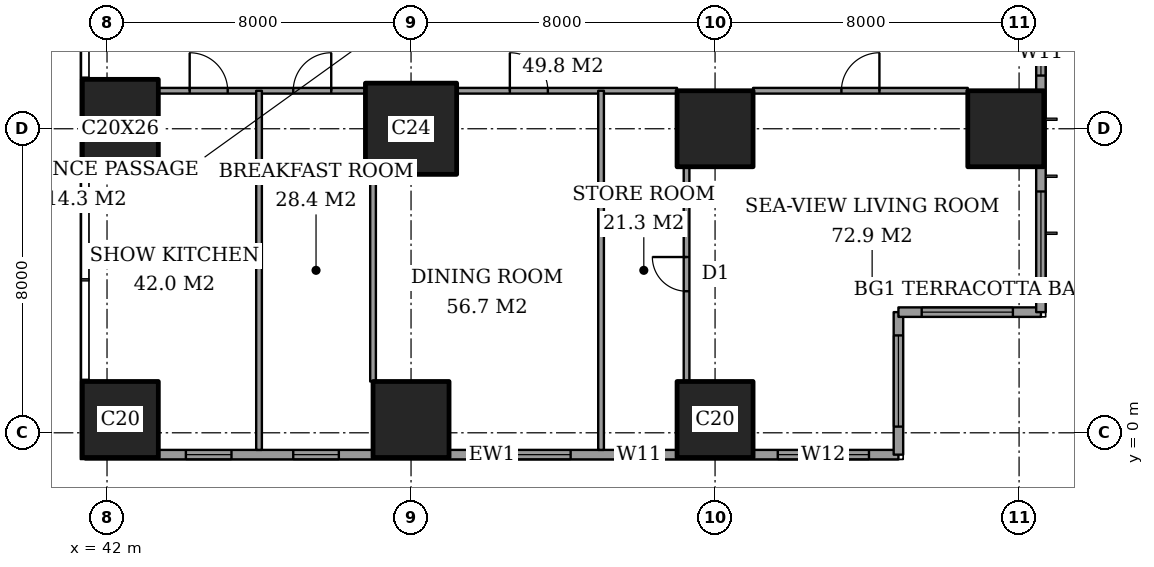
"""IFC4 building model, lengths in metres.
Left out: names, types, materials, properties, quantities, classifications, styles, units other than length and angle.
Written with IfcOpenShell. Run it as: python <this file> out.ifc"""

import sys

from ifc_helpers import new_model, si_unit, direction, frame, frame_2d, origin, origin_2d, place, context, subcontext, project, spatial, rectangle, extrude, element, fill, save


model = new_model("IFC4")
c1 = context("Model", 3, precision=1e-05, world=origin(), true_north=direction((0.0, 1.0)))
c2 = subcontext(c1, "Body", "Model", "MODEL_VIEW")
j1 = project(units=[si_unit("LENGTHUNIT", "METRE"), si_unit("PLANEANGLEUNIT", "RADIAN")], contexts=[c1])
p1 = place(None, origin())
s1 = spatial("IfcSite", under=j1, at=p1, CompositionType="ELEMENT")
p2 = place(p1, origin())
s2 = spatial("IfcBuilding", under=s1, at=p2, CompositionType="ELEMENT")
p3 = place(p2, frame((0.0, 0.0, 161.0)))
s3 = spatial("IfcBuildingStorey", under=s2, at=p3, CompositionType="ELEMENT", Elevation=161.0)
p4 = place(p3, frame((42.35, 0.35, 0.0), z_axis=(0.0, 0.0, 1.0), x_axis=(1.0, 0.0, 0.0)))
e1 = element("IfcColumn", 1, at=p4, inside=s3, PredefinedType="COLUMN", context=c2, shape_type="SweptSolid", body=[
    extrude(rectangle(XDim=2.0, YDim=2.0, at=origin_2d()), origin(), (0.0, 0.0, 1.0), 3.6),
])
p5 = place(p3, frame((42.35, 8.0, 0.0), z_axis=(0.0, 0.0, 1.0), x_axis=(1.0, 0.0, 0.0)))
e2 = element("IfcColumn", 2, at=p5, inside=s3, PredefinedType="COLUMN", context=c2, shape_type="SweptSolid", body=[
    extrude(rectangle(XDim=2.0, YDim=2.6, at=origin_2d()), origin(), (0.0, 0.0, 1.0), 3.6),
])
p6 = place(p3, frame((50.0, 0.35, 0.0), z_axis=(0.0, 0.0, 1.0), x_axis=(1.0, 0.0, 0.0)))
e3 = element("IfcColumn", 3, at=p6, inside=s3, PredefinedType="COLUMN", context=c2, shape_type="SweptSolid", body=[
    extrude(rectangle(XDim=2.0, YDim=2.0, at=origin_2d()), origin(), (0.0, 0.0, 1.0), 3.6),
])
p7 = place(p3, frame((50.0, 8.0, 0.0), z_axis=(0.0, 0.0, 1.0), x_axis=(1.0, 0.0, 0.0)))
e4 = element("IfcColumn", 4, at=p7, inside=s3, PredefinedType="COLUMN", context=c2, shape_type="SweptSolid", body=[
    extrude(rectangle(XDim=2.4, YDim=2.4, at=origin_2d()), origin(), (0.0, 0.0, 1.0), 3.6),
])
for number, where, z_axis, x_axis in (
    (5, (58.0, 0.35, 0.0), (0.0, 0.0, 1.0), (1.0, 0.0, 0.0)),
    (6, (58.0, 8.0, 0.0), (0.0, 0.0, 1.0), (1.0, 0.0, 0.0)),
    (7, (65.65, 8.0, 0.0), (0.0, 0.0, 1.0), (1.0, 0.0, 0.0)),
):
    element("IfcColumn", number, at=place(p3, frame(where, z_axis=z_axis, x_axis=x_axis)), inside=s3, PredefinedType="COLUMN", context=c2, shape_type="SweptSolid", body=[
        extrude(rectangle(XDim=2.0, YDim=2.0, at=origin_2d()), origin(), (0.0, 0.0, 1.0), 3.6),
    ])
p8 = place(p3, frame((41.425, -0.575, 0.0), z_axis=(0.0, 0.0, 1.0), x_axis=(1.0, 0.0, 0.0)))
e8 = element("IfcWall", 8, at=p8, inside=s3, PredefinedType="SOLIDWALL", context=c2, shape_type="SweptSolid", body=[
    extrude(rectangle(XDim=21.4, YDim=0.25, at=frame_2d((10.7, 0.0))), origin(), (0.0, 0.0, 1.0), 3.6),
])
p9 = place(p8, frame((2.65, 0.0, 0.4)))
e9 = element("IfcOpeningElement", 9, at=p9, cuts=e8, PredefinedType="OPENING", context=c2, shape_type="SweptSolid", body=[
    extrude(rectangle(XDim=1.2, YDim=2.2, at=frame_2d((0.6, 1.1))), frame((0.0, 0.135, 0.0), z_axis=(0.0, -1.0, 0.0), x_axis=(1.0, 0.0, 0.0)), (0.0, 0.0, 1.0), 0.27),
])
p10 = place(p8, frame((5.475, 0.0, 0.4)))
e10 = element("IfcOpeningElement", 10, at=p10, cuts=e8, PredefinedType="OPENING", context=c2, shape_type="SweptSolid", body=[
    extrude(rectangle(XDim=1.2, YDim=2.2, at=frame_2d((0.6, 1.1))), frame((0.0, 0.135, 0.0), z_axis=(0.0, -1.0, 0.0), x_axis=(1.0, 0.0, 0.0)), (0.0, 0.0, 1.0), 0.27),
])
p11 = place(p8, frame((10.375, 0.0, 0.4)))
e11 = element("IfcOpeningElement", 11, at=p11, cuts=e8, PredefinedType="OPENING", context=c2, shape_type="SweptSolid", body=[
    extrude(rectangle(XDim=2.4, YDim=2.2, at=frame_2d((1.2, 1.1))), frame((0.0, 0.135, 0.0), z_axis=(0.0, -1.0, 0.0), x_axis=(1.0, 0.0, 0.0)), (0.0, 0.0, 1.0), 0.27),
])
p12 = place(p8, frame((13.975, 0.0, 0.4)))
e12 = element("IfcOpeningElement", 12, at=p12, cuts=e8, PredefinedType="OPENING", context=c2, shape_type="SweptSolid", body=[
    extrude(rectangle(XDim=1.2, YDim=2.2, at=frame_2d((0.6, 1.1))), frame((0.0, 0.135, 0.0), z_axis=(0.0, -1.0, 0.0), x_axis=(1.0, 0.0, 0.0)), (0.0, 0.0, 1.0), 0.27),
])
p13 = place(p8, frame((18.225, 0.0, 0.4)))
e13 = element("IfcOpeningElement", 13, at=p13, cuts=e8, PredefinedType="OPENING", context=c2, shape_type="SweptSolid", body=[
    extrude(rectangle(XDim=2.4, YDim=2.2, at=frame_2d((1.2, 1.1))), frame((0.0, 0.135, 0.0), z_axis=(0.0, -1.0, 0.0), x_axis=(1.0, 0.0, 0.0)), (0.0, 0.0, 1.0), 0.27),
])
p14 = place(p3, frame((62.825, -0.575, 0.0), z_axis=(0.0, 0.0, 1.0), x_axis=(0.0, 1.0, 0.0)))
e14 = element("IfcWall", 14, at=p14, inside=s3, PredefinedType="SOLIDWALL", context=c2, shape_type="SweptSolid", body=[
    extrude(rectangle(XDim=3.75, YDim=0.25, at=frame_2d((1.875, 0.0))), origin(), (0.0, 0.0, 1.0), 3.6),
])
p15 = place(p14, frame((0.738, 0.0, 0.4)))
e15 = element("IfcOpeningElement", 15, at=p15, cuts=e14, PredefinedType="OPENING", context=c2, shape_type="SweptSolid", body=[
    extrude(rectangle(XDim=2.4, YDim=2.2, at=frame_2d((1.2, 1.1))), frame((0.0, 0.135, 0.0), z_axis=(0.0, -1.0, 0.0), x_axis=(1.0, 0.0, 0.0)), (0.0, 0.0, 1.0), 0.27),
])
p16 = place(p3, frame((62.825, 3.175, 0.0), z_axis=(0.0, 0.0, 1.0), x_axis=(1.0, 0.0, 0.0)))
e16 = element("IfcWall", 16, at=p16, inside=s3, PredefinedType="SOLIDWALL", context=c2, shape_type="SweptSolid", body=[
    extrude(rectangle(XDim=3.75, YDim=0.25, at=frame_2d((1.875, 0.0))), origin(), (0.0, 0.0, 1.0), 3.6),
])
p17 = place(p16, frame((0.613, 0.0, 0.4)))
e17 = element("IfcOpeningElement", 17, at=p17, cuts=e16, PredefinedType="OPENING", context=c2, shape_type="SweptSolid", body=[
    extrude(rectangle(XDim=2.4, YDim=2.2, at=frame_2d((1.2, 1.1))), frame((0.0, 0.135, 0.0), z_axis=(0.0, -1.0, 0.0), x_axis=(1.0, 0.0, 0.0)), (0.0, 0.0, 1.0), 0.27),
])
p18 = place(p3, frame((66.575, 3.175, 0.0), z_axis=(0.0, 0.0, 1.0), x_axis=(0.0, 1.0, 0.0)))
e18 = element("IfcWall", 18, at=p18, inside=s3, PredefinedType="SOLIDWALL", context=c2, shape_type="SweptSolid", body=[
    extrude(rectangle(XDim=41.65, YDim=0.25, at=frame_2d((20.825, 0.0))), origin(), (0.0, 0.0, 1.0), 3.6),
])
p19 = place(p18, frame((0.775, 0.0, 0.4)))
e19 = element("IfcOpeningElement", 19, at=p19, cuts=e18, PredefinedType="OPENING", context=c2, shape_type="SweptSolid", body=[
    extrude(rectangle(XDim=2.4, YDim=2.2, at=frame_2d((1.2, 1.1))), frame((0.0, 0.135, 0.0), z_axis=(0.0, -1.0, 0.0), x_axis=(1.0, 0.0, 0.0)), (0.0, 0.0, 1.0), 0.27),
])
p20 = place(p18, frame((6.225, 0.0, 0.4)))
e20 = element("IfcOpeningElement", 20, at=p20, cuts=e18, PredefinedType="OPENING", context=c2, shape_type="SweptSolid", body=[
    extrude(rectangle(XDim=1.2, YDim=2.2, at=frame_2d((0.6, 1.1))), frame((0.0, 0.135, 0.0), z_axis=(0.0, -1.0, 0.0), x_axis=(1.0, 0.0, 0.0)), (0.0, 0.0, 1.0), 0.27),
])
p21 = place(p18, frame((8.475, 0.0, 0.4)))
e21 = element("IfcOpeningElement", 21, at=p21, cuts=e18, PredefinedType="OPENING", context=c2, shape_type="SweptSolid", body=[
    extrude(rectangle(XDim=2.4, YDim=2.2, at=frame_2d((1.2, 1.1))), frame((0.0, 0.135, 0.0), z_axis=(0.0, -1.0, 0.0), x_axis=(1.0, 0.0, 0.0)), (0.0, 0.0, 1.0), 0.27),
])
p22 = place(p18, frame((15.775, 0.0, 0.4)))
e22 = element("IfcOpeningElement", 22, at=p22, cuts=e18, PredefinedType="OPENING", context=c2, shape_type="SweptSolid", body=[
    extrude(rectangle(XDim=2.4, YDim=2.2, at=frame_2d((1.2, 1.1))), frame((0.0, 0.135, 0.0), z_axis=(0.0, -1.0, 0.0), x_axis=(1.0, 0.0, 0.0)), (0.0, 0.0, 1.0), 0.27),
])
p23 = place(p18, frame((23.475, 0.0, 0.4)))
e23 = element("IfcOpeningElement", 23, at=p23, cuts=e18, PredefinedType="OPENING", context=c2, shape_type="SweptSolid", body=[
    extrude(rectangle(XDim=2.4, YDim=2.2, at=frame_2d((1.2, 1.1))), frame((0.0, 0.135, 0.0), z_axis=(0.0, -1.0, 0.0), x_axis=(1.0, 0.0, 0.0)), (0.0, 0.0, 1.0), 0.27),
])
p24 = place(p18, frame((30.975, 0.0, 0.4)))
e24 = element("IfcOpeningElement", 24, at=p24, cuts=e18, PredefinedType="OPENING", context=c2, shape_type="SweptSolid", body=[
    extrude(rectangle(XDim=2.4, YDim=2.2, at=frame_2d((1.2, 1.1))), frame((0.0, 0.135, 0.0), z_axis=(0.0, -1.0, 0.0), x_axis=(1.0, 0.0, 0.0)), (0.0, 0.0, 1.0), 0.27),
])
p25 = place(p18, frame((34.5, 0.0, 0.4)))
e25 = element("IfcOpeningElement", 25, at=p25, cuts=e18, PredefinedType="OPENING", context=c2, shape_type="SweptSolid", body=[
    extrude(rectangle(XDim=1.2, YDim=2.2, at=frame_2d((0.6, 1.1))), frame((0.0, 0.135, 0.0), z_axis=(0.0, -1.0, 0.0), x_axis=(1.0, 0.0, 0.0)), (0.0, 0.0, 1.0), 0.27),
])
p26 = place(p18, frame((38.475, 0.0, 0.4)))
e26 = element("IfcOpeningElement", 26, at=p26, cuts=e18, PredefinedType="OPENING", context=c2, shape_type="SweptSolid", body=[
    extrude(rectangle(XDim=2.4, YDim=2.2, at=frame_2d((1.2, 1.1))), frame((0.0, 0.135, 0.0), z_axis=(0.0, -1.0, 0.0), x_axis=(1.0, 0.0, 0.0)), (0.0, 0.0, 1.0), 0.27),
])
p27 = place(p3, frame((43.35, 9.0, 0.0), z_axis=(0.0, 0.0, 1.0), x_axis=(1.0, 0.0, 0.0)))
e27 = element("IfcWall", 27, at=p27, inside=s3, PredefinedType="PARTITIONING", context=c2, shape_type="SweptSolid", body=[
    extrude(rectangle(XDim=5.45, YDim=0.15, at=frame_2d((2.725, 0.0))), origin(), (0.0, 0.0, 1.0), 3.35),
])
p28 = place(p27, frame((3.55, 0.0, 0.0)))
e28 = element("IfcOpeningElement", 28, at=p28, cuts=e27, PredefinedType="OPENING", context=c2, shape_type="SweptSolid", body=[
    extrude(rectangle(XDim=1.0, YDim=2.1, at=frame_2d((0.5, 1.05))), frame((0.0, 0.085, 0.0), z_axis=(0.0, -1.0, 0.0), x_axis=(1.0, 0.0, 0.0)), (0.0, 0.0, 1.0), 0.17),
])
p29 = place(p27, frame((0.825, 0.0, 0.0)))
e29 = element("IfcOpeningElement", 29, at=p29, cuts=e27, PredefinedType="OPENING", context=c2, shape_type="SweptSolid", body=[
    extrude(rectangle(XDim=1.0, YDim=2.1, at=frame_2d((0.5, 1.05))), frame((0.0, 0.085, 0.0), z_axis=(0.0, -1.0, 0.0), x_axis=(1.0, 0.0, 0.0)), (0.0, 0.0, 1.0), 0.17),
])
p30 = place(p3, frame((51.2, 9.0, 0.0), z_axis=(0.0, 0.0, 1.0), x_axis=(1.0, 0.0, 0.0)))
e30 = element("IfcWall", 30, at=p30, inside=s3, PredefinedType="PARTITIONING", context=c2, shape_type="SweptSolid", body=[
    extrude(rectangle(XDim=5.8, YDim=0.15, at=frame_2d((2.9, 0.0))), origin(), (0.0, 0.0, 1.0), 3.35),
])
p31 = place(p30, frame((1.4, 0.0, 0.0)))
e31 = element("IfcOpeningElement", 31, at=p31, cuts=e30, PredefinedType="OPENING", context=c2, shape_type="SweptSolid", body=[
    extrude(rectangle(XDim=1.0, YDim=2.1, at=frame_2d((0.5, 1.05))), frame((0.0, 0.085, 0.0), z_axis=(0.0, -1.0, 0.0), x_axis=(1.0, 0.0, 0.0)), (0.0, 0.0, 1.0), 0.17),
])
p32 = place(p3, frame((59.0, 9.0, 0.0), z_axis=(0.0, 0.0, 1.0), x_axis=(1.0, 0.0, 0.0)))
e32 = element("IfcWall", 32, at=p32, inside=s3, PredefinedType="PARTITIONING", context=c2, shape_type="SweptSolid", body=[
    extrude(rectangle(XDim=5.65, YDim=0.15, at=frame_2d((2.825, 0.0))), origin(), (0.0, 0.0, 1.0), 3.35),
])
p33 = place(p32, frame((2.325, 0.0, 0.0)))
e33 = element("IfcOpeningElement", 33, at=p33, cuts=e32, PredefinedType="OPENING", context=c2, shape_type="SweptSolid", body=[
    extrude(rectangle(XDim=1.0, YDim=2.1, at=frame_2d((0.5, 1.05))), frame((0.0, 0.085, 0.0), z_axis=(0.0, -1.0, 0.0), x_axis=(1.0, 0.0, 0.0)), (0.0, 0.0, 1.0), 0.17),
])
p34 = place(p3, frame((46.0, -0.45, 0.0), z_axis=(0.0, 0.0, 1.0), x_axis=(0.0, 1.0, 0.0)))
e34 = element("IfcWall", 34, at=p34, inside=s3, PredefinedType="PARTITIONING", context=c2, shape_type="SweptSolid", body=[
    extrude(rectangle(XDim=9.45, YDim=0.15, at=frame_2d((4.725, 0.0))), origin(), (0.0, 0.0, 1.0), 3.35),
])
p35 = place(p3, frame((49.0, 1.35, 0.0), z_axis=(0.0, 0.0, 1.0), x_axis=(0.0, 1.0, 0.0)))
e35 = element("IfcWall", 35, at=p35, inside=s3, PredefinedType="PARTITIONING", context=c2, shape_type="SweptSolid", body=[
    extrude(rectangle(XDim=5.45, YDim=0.15, at=frame_2d((2.725, 0.0))), origin(), (0.0, 0.0, 1.0), 3.35),
])
p36 = place(p3, frame((55.0, -0.45, 0.0), z_axis=(0.0, 0.0, 1.0), x_axis=(0.0, 1.0, 0.0)))
e36 = element("IfcWall", 36, at=p36, inside=s3, PredefinedType="PARTITIONING", context=c2, shape_type="SweptSolid", body=[
    extrude(rectangle(XDim=9.45, YDim=0.15, at=frame_2d((4.725, 0.0))), origin(), (0.0, 0.0, 1.0), 3.35),
])
p37 = place(p3, frame((57.25, 1.35, 0.0), z_axis=(0.0, 0.0, 1.0), x_axis=(0.0, 1.0, 0.0)))
e37 = element("IfcWall", 37, at=p37, inside=s3, PredefinedType="PARTITIONING", context=c2, shape_type="SweptSolid", body=[
    extrude(rectangle(XDim=5.65, YDim=0.15, at=frame_2d((2.825, 0.0))), origin(), (0.0, 0.0, 1.0), 3.35),
])
p38 = place(p37, frame((2.375, 0.0, 0.0)))
e38 = element("IfcOpeningElement", 38, at=p38, cuts=e37, PredefinedType="OPENING", context=c2, shape_type="SweptSolid", body=[
    extrude(rectangle(XDim=0.9, YDim=2.1, at=frame_2d((0.45, 1.05))), frame((0.0, 0.085, 0.0), z_axis=(0.0, -1.0, 0.0), x_axis=(1.0, 0.0, 0.0)), (0.0, 0.0, 1.0), 0.17),
])
p39 = place(p9, origin())
e39 = element("IfcWindow", 39, at=p39, inside=s3, PartitioningType="SINGLE_PANEL", PredefinedType="WINDOW", context=c2, shape_type="SweptSolid", body=[
    extrude(rectangle(XDim=1.2, YDim=2.2, at=frame_2d((0.6, 1.1))), frame((0.0, 0.03, 0.0), z_axis=(0.0, -1.0, 0.0), x_axis=(1.0, 0.0, 0.0)), (0.0, 0.0, 1.0), 0.06),
])
fill(e9, e39)
p40 = place(p10, origin())
e40 = element("IfcWindow", 40, at=p40, inside=s3, PartitioningType="SINGLE_PANEL", PredefinedType="WINDOW", context=c2, shape_type="SweptSolid", body=[
    extrude(rectangle(XDim=1.2, YDim=2.2, at=frame_2d((0.6, 1.1))), frame((0.0, 0.03, 0.0), z_axis=(0.0, -1.0, 0.0), x_axis=(1.0, 0.0, 0.0)), (0.0, 0.0, 1.0), 0.06),
])
fill(e10, e40)
p41 = place(p11, origin())
e41 = element("IfcWindow", 41, at=p41, inside=s3, PartitioningType="SINGLE_PANEL", PredefinedType="WINDOW", context=c2, shape_type="SweptSolid", body=[
    extrude(rectangle(XDim=2.4, YDim=2.2, at=frame_2d((1.2, 1.1))), frame((0.0, 0.03, 0.0), z_axis=(0.0, -1.0, 0.0), x_axis=(1.0, 0.0, 0.0)), (0.0, 0.0, 1.0), 0.06),
])
fill(e11, e41)
p42 = place(p12, origin())
e42 = element("IfcWindow", 42, at=p42, inside=s3, PartitioningType="SINGLE_PANEL", PredefinedType="WINDOW", context=c2, shape_type="SweptSolid", body=[
    extrude(rectangle(XDim=1.2, YDim=2.2, at=frame_2d((0.6, 1.1))), frame((0.0, 0.03, 0.0), z_axis=(0.0, -1.0, 0.0), x_axis=(1.0, 0.0, 0.0)), (0.0, 0.0, 1.0), 0.06),
])
fill(e12, e42)
p43 = place(p13, origin())
e43 = element("IfcWindow", 43, at=p43, inside=s3, PartitioningType="SINGLE_PANEL", PredefinedType="WINDOW", context=c2, shape_type="SweptSolid", body=[
    extrude(rectangle(XDim=2.4, YDim=2.2, at=frame_2d((1.2, 1.1))), frame((0.0, 0.03, 0.0), z_axis=(0.0, -1.0, 0.0), x_axis=(1.0, 0.0, 0.0)), (0.0, 0.0, 1.0), 0.06),
])
fill(e13, e43)
p44 = place(p15, origin())
e44 = element("IfcWindow", 44, at=p44, inside=s3, PartitioningType="SINGLE_PANEL", PredefinedType="WINDOW", context=c2, shape_type="SweptSolid", body=[
    extrude(rectangle(XDim=2.4, YDim=2.2, at=frame_2d((1.2, 1.1))), frame((0.0, 0.03, 0.0), z_axis=(0.0, -1.0, 0.0), x_axis=(1.0, 0.0, 0.0)), (0.0, 0.0, 1.0), 0.06),
])
fill(e15, e44)
p45 = place(p17, origin())
e45 = element("IfcWindow", 45, at=p45, inside=s3, PartitioningType="SINGLE_PANEL", PredefinedType="WINDOW", context=c2, shape_type="SweptSolid", body=[
    extrude(rectangle(XDim=2.4, YDim=2.2, at=frame_2d((1.2, 1.1))), frame((0.0, 0.03, 0.0), z_axis=(0.0, -1.0, 0.0), x_axis=(1.0, 0.0, 0.0)), (0.0, 0.0, 1.0), 0.06),
])
fill(e17, e45)
p46 = place(p19, origin())
e46 = element("IfcWindow", 46, at=p46, inside=s3, PartitioningType="SINGLE_PANEL", PredefinedType="WINDOW", context=c2, shape_type="SweptSolid", body=[
    extrude(rectangle(XDim=2.4, YDim=2.2, at=frame_2d((1.2, 1.1))), frame((0.0, 0.03, 0.0), z_axis=(0.0, -1.0, 0.0), x_axis=(1.0, 0.0, 0.0)), (0.0, 0.0, 1.0), 0.06),
])
fill(e19, e46)
p47 = place(p20, origin())
e47 = element("IfcWindow", 47, at=p47, inside=s3, PartitioningType="SINGLE_PANEL", PredefinedType="WINDOW", context=c2, shape_type="SweptSolid", body=[
    extrude(rectangle(XDim=1.2, YDim=2.2, at=frame_2d((0.6, 1.1))), frame((0.0, 0.03, 0.0), z_axis=(0.0, -1.0, 0.0), x_axis=(1.0, 0.0, 0.0)), (0.0, 0.0, 1.0), 0.06),
])
fill(e20, e47)
p48 = place(p33, origin())
e48 = element("IfcDoor", 48, at=p48, inside=s3, OperationType="SINGLE_SWING_LEFT", PredefinedType="DOOR", context=c2, shape_type="SweptSolid", body=[
    extrude(rectangle(XDim=1.0, YDim=2.1, at=frame_2d((0.5, 1.05))), frame((0.0, 0.025, 0.0), z_axis=(0.0, -1.0, 0.0), x_axis=(1.0, 0.0, 0.0)), (0.0, 0.0, 1.0), 0.05),
])
fill(e33, e48)
p49 = place(p38, origin())
e49 = element("IfcDoor", 49, at=p49, inside=s3, OperationType="SINGLE_SWING_LEFT", PredefinedType="DOOR", context=c2, shape_type="SweptSolid", body=[
    extrude(rectangle(XDim=0.9, YDim=2.1, at=frame_2d((0.45, 1.05))), frame((0.0, 0.025, 0.0), z_axis=(0.0, -1.0, 0.0), x_axis=(1.0, 0.0, 0.0)), (0.0, 0.0, 1.0), 0.05),
])
fill(e38, e49)
p50 = place(p31, origin())
e50 = element("IfcDoor", 50, at=p50, inside=s3, OperationType="SINGLE_SWING_RIGHT", PredefinedType="DOOR", context=c2, shape_type="SweptSolid", body=[
    extrude(rectangle(XDim=1.0, YDim=2.1, at=frame_2d((0.5, 1.05))), frame((0.0, 0.025, 0.0), z_axis=(0.0, -1.0, 0.0), x_axis=(1.0, 0.0, 0.0)), (0.0, 0.0, 1.0), 0.05),
])
fill(e31, e50)
p51 = place(p28, origin())
e51 = element("IfcDoor", 51, at=p51, inside=s3, OperationType="SINGLE_SWING_LEFT", PredefinedType="DOOR", context=c2, shape_type="SweptSolid", body=[
    extrude(rectangle(XDim=1.0, YDim=2.1, at=frame_2d((0.5, 1.05))), frame((0.0, 0.025, 0.0), z_axis=(0.0, -1.0, 0.0), x_axis=(1.0, 0.0, 0.0)), (0.0, 0.0, 1.0), 0.05),
])
fill(e28, e51)
p52 = place(p29, origin())
e52 = element("IfcDoor", 52, at=p52, inside=s3, OperationType="SINGLE_SWING_RIGHT", PredefinedType="DOOR", context=c2, shape_type="SweptSolid", body=[
    extrude(rectangle(XDim=1.0, YDim=2.1, at=frame_2d((0.5, 1.05))), frame((0.0, 0.025, 0.0), z_axis=(0.0, -1.0, 0.0), x_axis=(1.0, 0.0, 0.0)), (0.0, 0.0, 1.0), 0.05),
])
fill(e29, e52)
save(model, sys.argv[1])
